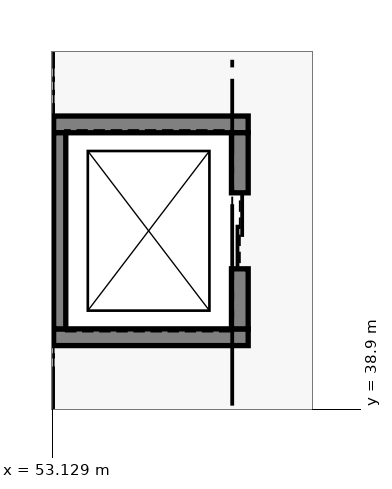
"""IFC4 building model, lengths in metres.
Left out: names, types, materials, properties, quantities, classifications, styles, units other than length and angle.
Written with IfcOpenShell. Run it as: python <this file> out.ifc"""

import sys

from ifc_helpers import new_model, si_unit, direction, frame, frame_2d, origin, place, context, subcontext, project, spatial, rectangle, extrude, element, fill, save


model = new_model("IFC4")
c1 = context("Model", 3, precision=1e-05, world=origin(), true_north=direction((0.0, 1.0)))
c2 = subcontext(c1, "Body", "Model", "MODEL_VIEW")
j1 = project(units=[si_unit("LENGTHUNIT", "METRE"), si_unit("PLANEANGLEUNIT", "RADIAN")], contexts=[c1])
p1 = place(None, origin())
s1 = spatial("IfcSite", under=j1, at=p1, CompositionType="ELEMENT")
p2 = place(p1, origin())
s2 = spatial("IfcBuilding", under=s1, at=p2, CompositionType="ELEMENT")
p3 = place(p2, frame((0.0, 0.0, 13.2)))
s3 = spatial("IfcBuildingStorey", under=s2, at=p3, CompositionType="ELEMENT", Elevation=13.2)
for number, where, z_axis, x_axis in (
    (1, (53.09, 39.85, 0.0), (0.0, 0.0, 1.0), (1.0, 0.0, 0.0)),
    (2, (53.09, 42.65, 0.0), (0.0, 0.0, 1.0), (1.0, 0.0, 0.0)),
):
    element("IfcWall", number, at=place(p3, frame(where, z_axis=z_axis, x_axis=x_axis)), inside=s3, PredefinedType="SOLIDWALL", context=c2, shape_type="SweptSolid", body=[
        extrude(rectangle(XDim=2.62, YDim=0.22, at=frame_2d((1.31, 0.0))), origin(), (0.0, 0.0, 1.0), 3.62),
    ])
p4 = place(p3, frame((53.2, 39.96, 0.0), z_axis=(0.0, 0.0, 1.0), x_axis=(0.0, 1.0, 0.0)))
e3 = element("IfcWall", 3, at=p4, inside=s3, PredefinedType="SOLIDWALL", context=c2, shape_type="SweptSolid", body=[
    extrude(rectangle(XDim=2.58, YDim=0.22, at=frame_2d((1.29, 0.0))), origin(), (0.0, 0.0, 1.0), 3.62),
])
p5 = place(p3, frame((55.6, 39.96, 0.0), z_axis=(0.0, 0.0, 1.0), x_axis=(0.0, 1.0, 0.0)))
e4 = element("IfcWall", 4, at=p5, inside=s3, PredefinedType="SOLIDWALL", context=c2, shape_type="SweptSolid", body=[
    extrude(rectangle(XDim=2.58, YDim=0.22, at=frame_2d((1.29, 0.0))), origin(), (0.0, 0.0, 1.0), 3.62),
])
p6 = place(p5, frame((0.79, 0.0, 0.0)))
e5 = element("IfcOpeningElement", 5, at=p6, cuts=e4, PredefinedType="OPENING", context=c2, shape_type="SweptSolid", body=[
    extrude(rectangle(XDim=1.0, YDim=2.15, at=frame_2d((0.5, 1.075))), frame((0.0, 0.12, 0.0), z_axis=(0.0, -1.0, 0.0), x_axis=(1.0, 0.0, 0.0)), (0.0, 0.0, 1.0), 0.24),
])
p7 = place(p6, origin())
e6 = element("IfcDoor", 6, at=p7, inside=s3, OperationType="SLIDING_TO_LEFT", PredefinedType="DOOR", context=c2, shape_type="SweptSolid", body=[
    extrude(rectangle(XDim=1.0, YDim=2.15, at=frame_2d((0.5, 1.075))), frame((0.0, 0.025, 0.0), z_axis=(0.0, -1.0, 0.0), x_axis=(1.0, 0.0, 0.0)), (0.0, 0.0, 1.0), 0.05),
])
fill(e5, e6)
save(model, sys.argv[1])
